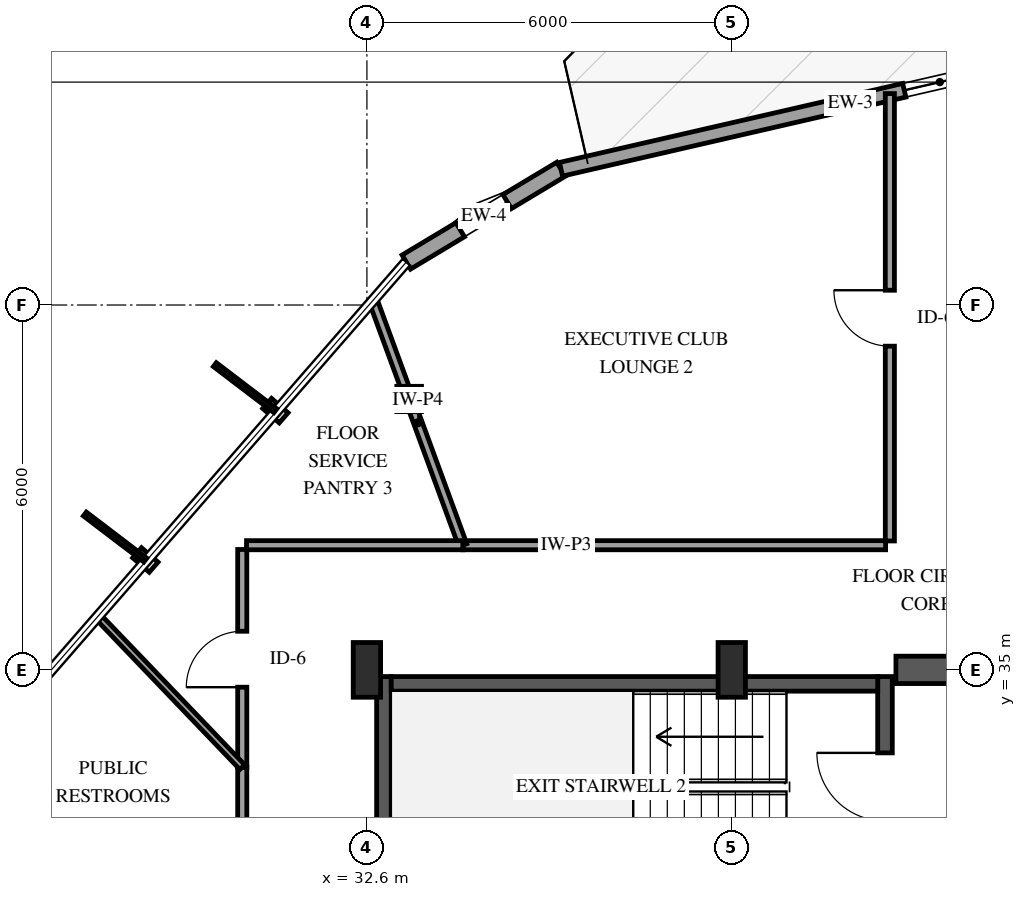
"""IFC4 building model, lengths in metres.
Left out: names, types, materials, properties, quantities, classifications, styles, units other than length and angle.
Written with IfcOpenShell. Run it as: python <this file> out.ifc"""

import sys

from ifc_helpers import new_model, si_unit, direction, frame, frame_2d, origin, origin_2d, place, context, subcontext, project, spatial, rectangle, i_section, extrude, element, fill, save


model = new_model("IFC4")
c1 = context("Model", 3, precision=1e-05, world=origin(), true_north=direction((0.0, 1.0)))
c2 = subcontext(c1, "Body", "Model", "MODEL_VIEW")
j1 = project(units=[si_unit("LENGTHUNIT", "METRE"), si_unit("PLANEANGLEUNIT", "RADIAN")], contexts=[c1])
p1 = place(None, origin())
s1 = spatial("IfcSite", under=j1, at=p1, CompositionType="ELEMENT")
p2 = place(p1, origin())
s2 = spatial("IfcBuilding", under=s1, at=p2, CompositionType="ELEMENT")
p3 = place(p2, frame((0.0, 0.0, 212.2)))
s3 = spatial("IfcBuildingStorey", under=s2, at=p3, CompositionType="ELEMENT", Elevation=212.2)
p4 = place(p3, frame((32.88, 31.26, 0.0), z_axis=(0.0, 0.0, 1.0), x_axis=(0.0, 1.0, 0.0)))
e1 = element("IfcWall", 1, at=p4, inside=s3, PredefinedType="SHEAR", context=c2, shape_type="SweptSolid", body=[
    extrude(rectangle(XDim=3.63, YDim=0.24, at=frame_2d((1.815, 0.0))), origin(), (0.0, 0.0, 1.0), 3.6),
])
p5 = place(p3, frame((41.12, 31.26, 0.0), z_axis=(0.0, 0.0, 1.0), x_axis=(0.0, 1.0, 0.0)))
e2 = element("IfcWall", 2, at=p5, inside=s3, PredefinedType="SHEAR", context=c2, shape_type="SweptSolid", body=[
    extrude(rectangle(XDim=3.63, YDim=0.24, at=frame_2d((1.815, 0.0))), origin(), (0.0, 0.0, 1.0), 3.6),
])
p6 = place(p5, frame((1.255, 0.0, 0.0)))
e3 = element("IfcOpeningElement", 3, at=p6, cuts=e2, PredefinedType="OPENING", context=c2, shape_type="SweptSolid", body=[
    extrude(rectangle(XDim=1.12, YDim=2.15, at=frame_2d((0.56, 1.075))), frame((0.0, 0.13, 0.0), z_axis=(0.0, -1.0, 0.0), x_axis=(1.0, 0.0, 0.0)), (0.0, 0.0, 1.0), 0.26),
])
p7 = place(p3, frame((33.0, 34.77, 0.0), z_axis=(0.0, 0.0, 1.0), x_axis=(1.0, 0.0, 0.0)))
e4 = element("IfcWall", 4, at=p7, inside=s3, PredefinedType="SHEAR", context=c2, shape_type="SweptSolid", body=[
    extrude(rectangle(XDim=8.0, YDim=0.24, at=frame_2d((4.0, 0.0))), origin(), (0.0, 0.0, 1.0), 3.6),
])
p8 = place(p3, frame((41.3, 35.0, 0.0), z_axis=(0.0, 0.0, 1.0), x_axis=(1.0, 0.0, 0.0)))
e5 = element("IfcWall", 5, at=p8, inside=s3, PredefinedType="SHEAR", context=c2, shape_type="SweptSolid", body=[
    extrude(rectangle(XDim=2.85, YDim=0.45, at=frame_2d((1.425, 0.0))), origin(), (0.0, 0.0, 1.0), 3.6),
])
for number, where, z_axis, x_axis in (
    (6, (32.6, 35.0, 0.0), (0.0, 0.0, 1.0), (1.0, 0.0, 0.0)),
    (7, (38.6, 35.0, 0.0), (0.0, 0.0, 1.0), (1.0, 0.0, 0.0)),
):
    element("IfcColumn", number, at=place(p3, frame(where, z_axis=z_axis, x_axis=x_axis)), inside=s3, PredefinedType="PILASTER", context=c2, shape_type="SweptSolid", body=[
        extrude(rectangle(XDim=0.45, YDim=0.9, at=origin_2d()), origin(), (0.0, 0.0, 1.0), 3.6),
    ])
p9 = place(p3, frame((33.295, 39.455, 0.0), z_axis=(0.0, 0.0, 1.0), x_axis=(1.0, 0.0, 0.0)))
e8 = element("IfcColumn", 8, at=p9, inside=s3, PredefinedType="COLUMN", context=c2, shape_type="SweptSolid", body=[
    extrude(i_section(OverallWidth=0.406, OverallDepth=0.416, WebThickness=0.03, FlangeThickness=0.048, FilletRadius=0.038, at=origin_2d()), origin(), (0.0, 0.0, 1.0), 3.6),
])
p10 = place(p3, frame((35.792, 43.232, 0.0), z_axis=(0.0, 0.0, 1.0), x_axis=(-0.857507449303, -0.51447154867, 0.0)))
e9 = element("IfcWall", 9, at=p10, inside=s3, PredefinedType="SOLIDWALL", context=c2, shape_type="SweptSolid", body=[
    extrude(rectangle(XDim=2.966, YDim=0.27, at=frame_2d((1.483, 0.0))), origin(), (0.0, 0.0, 1.0), 2.679),
])
p11 = place(p10, frame((1.033, 0.0, 0.75)))
e10 = element("IfcOpeningElement", 10, at=p11, cuts=e9, PredefinedType="OPENING", context=c2, shape_type="SweptSolid", body=[
    extrude(rectangle(XDim=0.9, YDim=1.5, at=frame_2d((0.45, 0.75))), frame((0.0, 0.145, 0.0), z_axis=(0.0, -1.0, 0.0), x_axis=(1.0, 0.0, 0.0)), (0.0, 0.0, 1.0), 0.29),
])
p12 = place(p3, frame((45.312, 45.423, 0.0), z_axis=(0.0, 0.0, 1.0), x_axis=(-0.974525807261, -0.224275390941, 0.0)))
e11 = element("IfcWall", 11, at=p12, inside=s3, PredefinedType="SOLIDWALL", context=c2, shape_type="SweptSolid", body=[
    extrude(rectangle(XDim=9.769, YDim=0.23, at=frame_2d((4.884, 0.0))), origin(), (0.0, 0.0, 1.0), 2.679),
])
p13 = place(p12, frame((0.65, 0.0, 0.0)))
e12 = element("IfcOpeningElement", 12, at=p13, cuts=e11, PredefinedType="OPENING", context=c2, shape_type="SweptSolid", body=[
    extrude(rectangle(XDim=1.0, YDim=2.15, at=frame_2d((0.5, 1.075))), frame((0.0, 0.125, 0.0), z_axis=(0.0, -1.0, 0.0), x_axis=(1.0, 0.0, 0.0)), (0.0, 0.0, 1.0), 0.25),
])
p14 = place(p12, frame((2.777, 0.0, 0.72)))
e13 = element("IfcOpeningElement", 13, at=p14, cuts=e11, PredefinedType="OPENING", context=c2, shape_type="SweptSolid", body=[
    extrude(rectangle(XDim=1.2, YDim=1.6, at=frame_2d((0.6, 0.8))), frame((0.0, 0.125, 0.0), z_axis=(0.0, -1.0, 0.0), x_axis=(1.0, 0.0, 0.0)), (0.0, 0.0, 1.0), 0.25),
])
p15 = place(p3, frame((41.2, 37.12, 0.0), z_axis=(0.0, 0.0, 1.0), x_axis=(0.0, 1.0, 0.0)))
e14 = element("IfcWall", 14, at=p15, inside=s3, PredefinedType="PARTITIONING", context=c2, shape_type="SweptSolid", body=[
    extrude(rectangle(XDim=7.357, YDim=0.15, at=frame_2d((3.678, 0.0))), origin(), (0.0, 0.0, 1.0), 2.674),
])
p16 = place(p15, frame((3.203, 0.0, 0.0)))
e15 = element("IfcOpeningElement", 15, at=p16, cuts=e14, PredefinedType="OPENING", context=c2, shape_type="SweptSolid", body=[
    extrude(rectangle(XDim=0.92, YDim=2.12, at=frame_2d((0.46, 1.06))), frame((0.0, 0.085, 0.0), z_axis=(0.0, -1.0, 0.0), x_axis=(1.0, 0.0, 0.0)), (0.0, 0.0, 1.0), 0.17),
])
p17 = place(p3, frame((34.177, 37.05, 0.0), z_axis=(0.0, 0.0, 1.0), x_axis=(1.0, 0.0, 0.0)))
e16 = element("IfcWall", 16, at=p17, inside=s3, PredefinedType="PARTITIONING", context=c2, shape_type="SweptSolid", body=[
    extrude(rectangle(XDim=6.953, YDim=0.15, at=frame_2d((3.477, 0.0))), origin(), (0.0, 0.0, 1.0), 3.3),
])
p18 = place(p3, frame((30.55, 28.351, 0.0), z_axis=(0.0, 0.0, 1.0), x_axis=(0.0, 1.0, 0.0)))
e17 = element("IfcWall", 17, at=p18, inside=s3, PredefinedType="PARTITIONING", context=c2, shape_type="SweptSolid", body=[
    extrude(rectangle(XDim=5.05, YDim=0.15, at=frame_2d((2.525, 0.0))), origin(), (0.0, 0.0, 1.0), 3.3),
])
p19 = place(p18, frame((2.05, 0.0, 0.0)))
e18 = element("IfcOpeningElement", 18, at=p19, cuts=e17, PredefinedType="OPENING", context=c2, shape_type="SweptSolid", body=[
    extrude(rectangle(XDim=0.92, YDim=2.12, at=frame_2d((0.46, 1.06))), frame((0.0, 0.085, 0.0), z_axis=(0.0, -1.0, 0.0), x_axis=(1.0, 0.0, 0.0)), (0.0, 0.0, 1.0), 0.17),
])
p20 = place(p3, frame((34.177, 37.05, 0.0), z_axis=(0.0, 0.0, 1.0), x_axis=(-0.344438653937, 0.938808827011, 0.0)))
e19 = element("IfcWall", 19, at=p20, inside=s3, PredefinedType="PARTITIONING", context=c2, shape_type="SweptSolid", body=[
    extrude(rectangle(XDim=4.288, YDim=0.14, at=frame_2d((2.144, 0.0))), origin(), (0.0, 0.0, 1.0), 2.595),
])
p21 = place(p3, frame((30.55, 33.401, 0.0), z_axis=(0.0, 0.0, 1.0), x_axis=(0.0, 1.0, 0.0)))
e20 = element("IfcWall", 20, at=p21, inside=s3, PredefinedType="PARTITIONING", context=c2, shape_type="SweptSolid", body=[
    extrude(rectangle(XDim=3.579, YDim=0.15, at=frame_2d((1.79, 0.0))), origin(), (0.0, 0.0, 1.0), 3.3),
])
p22 = place(p21, frame((1.314, 0.0, 0.0)))
e21 = element("IfcOpeningElement", 21, at=p22, cuts=e20, PredefinedType="OPENING", context=c2, shape_type="SweptSolid", body=[
    extrude(rectangle(XDim=0.92, YDim=2.12, at=frame_2d((0.46, 1.06))), frame((0.0, 0.085, 0.0), z_axis=(0.0, -1.0, 0.0), x_axis=(1.0, 0.0, 0.0)), (0.0, 0.0, 1.0), 0.17),
])
p23 = place(p3, frame((30.62, 37.05, 0.0), z_axis=(0.0, 0.0, 1.0), x_axis=(1.0, 0.0, 0.0)))
e22 = element("IfcWall", 22, at=p23, inside=s3, PredefinedType="PARTITIONING", context=c2, shape_type="SweptSolid", body=[
    extrude(rectangle(XDim=3.557, YDim=0.15, at=frame_2d((1.778, 0.0))), origin(), (0.0, 0.0, 1.0), 3.3),
])
p24 = place(p3, frame((30.55, 33.401, 0.0), z_axis=(0.0, 0.0, 1.0), x_axis=(-0.691939349726, 0.721955633194, 0.0)))
e23 = element("IfcWall", 23, at=p24, inside=s3, PredefinedType="PARTITIONING", context=c2, shape_type="SweptSolid", body=[
    extrude(rectangle(XDim=3.432, YDim=0.11, at=frame_2d((1.716, 0.0))), origin(), (0.0, 0.0, 1.0), 3.3),
])
p25 = place(p11, origin())
e24 = element("IfcWindow", 24, at=p25, inside=s3, PartitioningType="SINGLE_PANEL", PredefinedType="WINDOW", context=c2, shape_type="SweptSolid", body=[
    extrude(rectangle(XDim=0.9, YDim=1.5, at=frame_2d((0.45, 0.75))), frame((0.0, 0.03, 0.0), z_axis=(0.0, -1.0, 0.0), x_axis=(1.0, 0.0, 0.0)), (0.0, 0.0, 1.0), 0.06),
])
fill(e10, e24)
p26 = place(p14, origin())
e25 = element("IfcWindow", 25, at=p26, inside=s3, PartitioningType="SINGLE_PANEL", PredefinedType="WINDOW", context=c2, shape_type="SweptSolid", body=[
    extrude(rectangle(XDim=1.2, YDim=1.6, at=frame_2d((0.6, 0.8))), frame((0.0, 0.03, 0.0), z_axis=(0.0, -1.0, 0.0), x_axis=(1.0, 0.0, 0.0)), (0.0, 0.0, 1.0), 0.06),
])
fill(e13, e25)
p27 = place(p6, origin())
e26 = element("IfcDoor", 26, at=p27, inside=s3, OperationType="SINGLE_SWING_RIGHT", PredefinedType="DOOR", context=c2, shape_type="SweptSolid", body=[
    extrude(rectangle(XDim=1.12, YDim=2.15, at=frame_2d((0.56, 1.075))), frame((0.0, 0.025, 0.0), z_axis=(0.0, -1.0, 0.0), x_axis=(1.0, 0.0, 0.0)), (0.0, 0.0, 1.0), 0.05),
])
fill(e3, e26)
p28 = place(p16, origin())
e27 = element("IfcDoor", 27, at=p28, inside=s3, OperationType="SINGLE_SWING_RIGHT", PredefinedType="DOOR", context=c2, shape_type="SweptSolid", body=[
    extrude(rectangle(XDim=0.92, YDim=2.12, at=frame_2d((0.46, 1.06))), frame((0.0, 0.025, 0.0), z_axis=(0.0, -1.0, 0.0), x_axis=(1.0, 0.0, 0.0)), (0.0, 0.0, 1.0), 0.05),
])
fill(e15, e27)
p29 = place(p22, origin())
e28 = element("IfcDoor", 28, at=p29, inside=s3, OperationType="SINGLE_SWING_LEFT", PredefinedType="DOOR", context=c2, shape_type="SweptSolid", body=[
    extrude(rectangle(XDim=0.92, YDim=2.12, at=frame_2d((0.46, 1.06))), frame((0.0, 0.025, 0.0), z_axis=(0.0, -1.0, 0.0), x_axis=(1.0, 0.0, 0.0)), (0.0, 0.0, 1.0), 0.05),
])
fill(e21, e28)
save(model, sys.argv[1])
